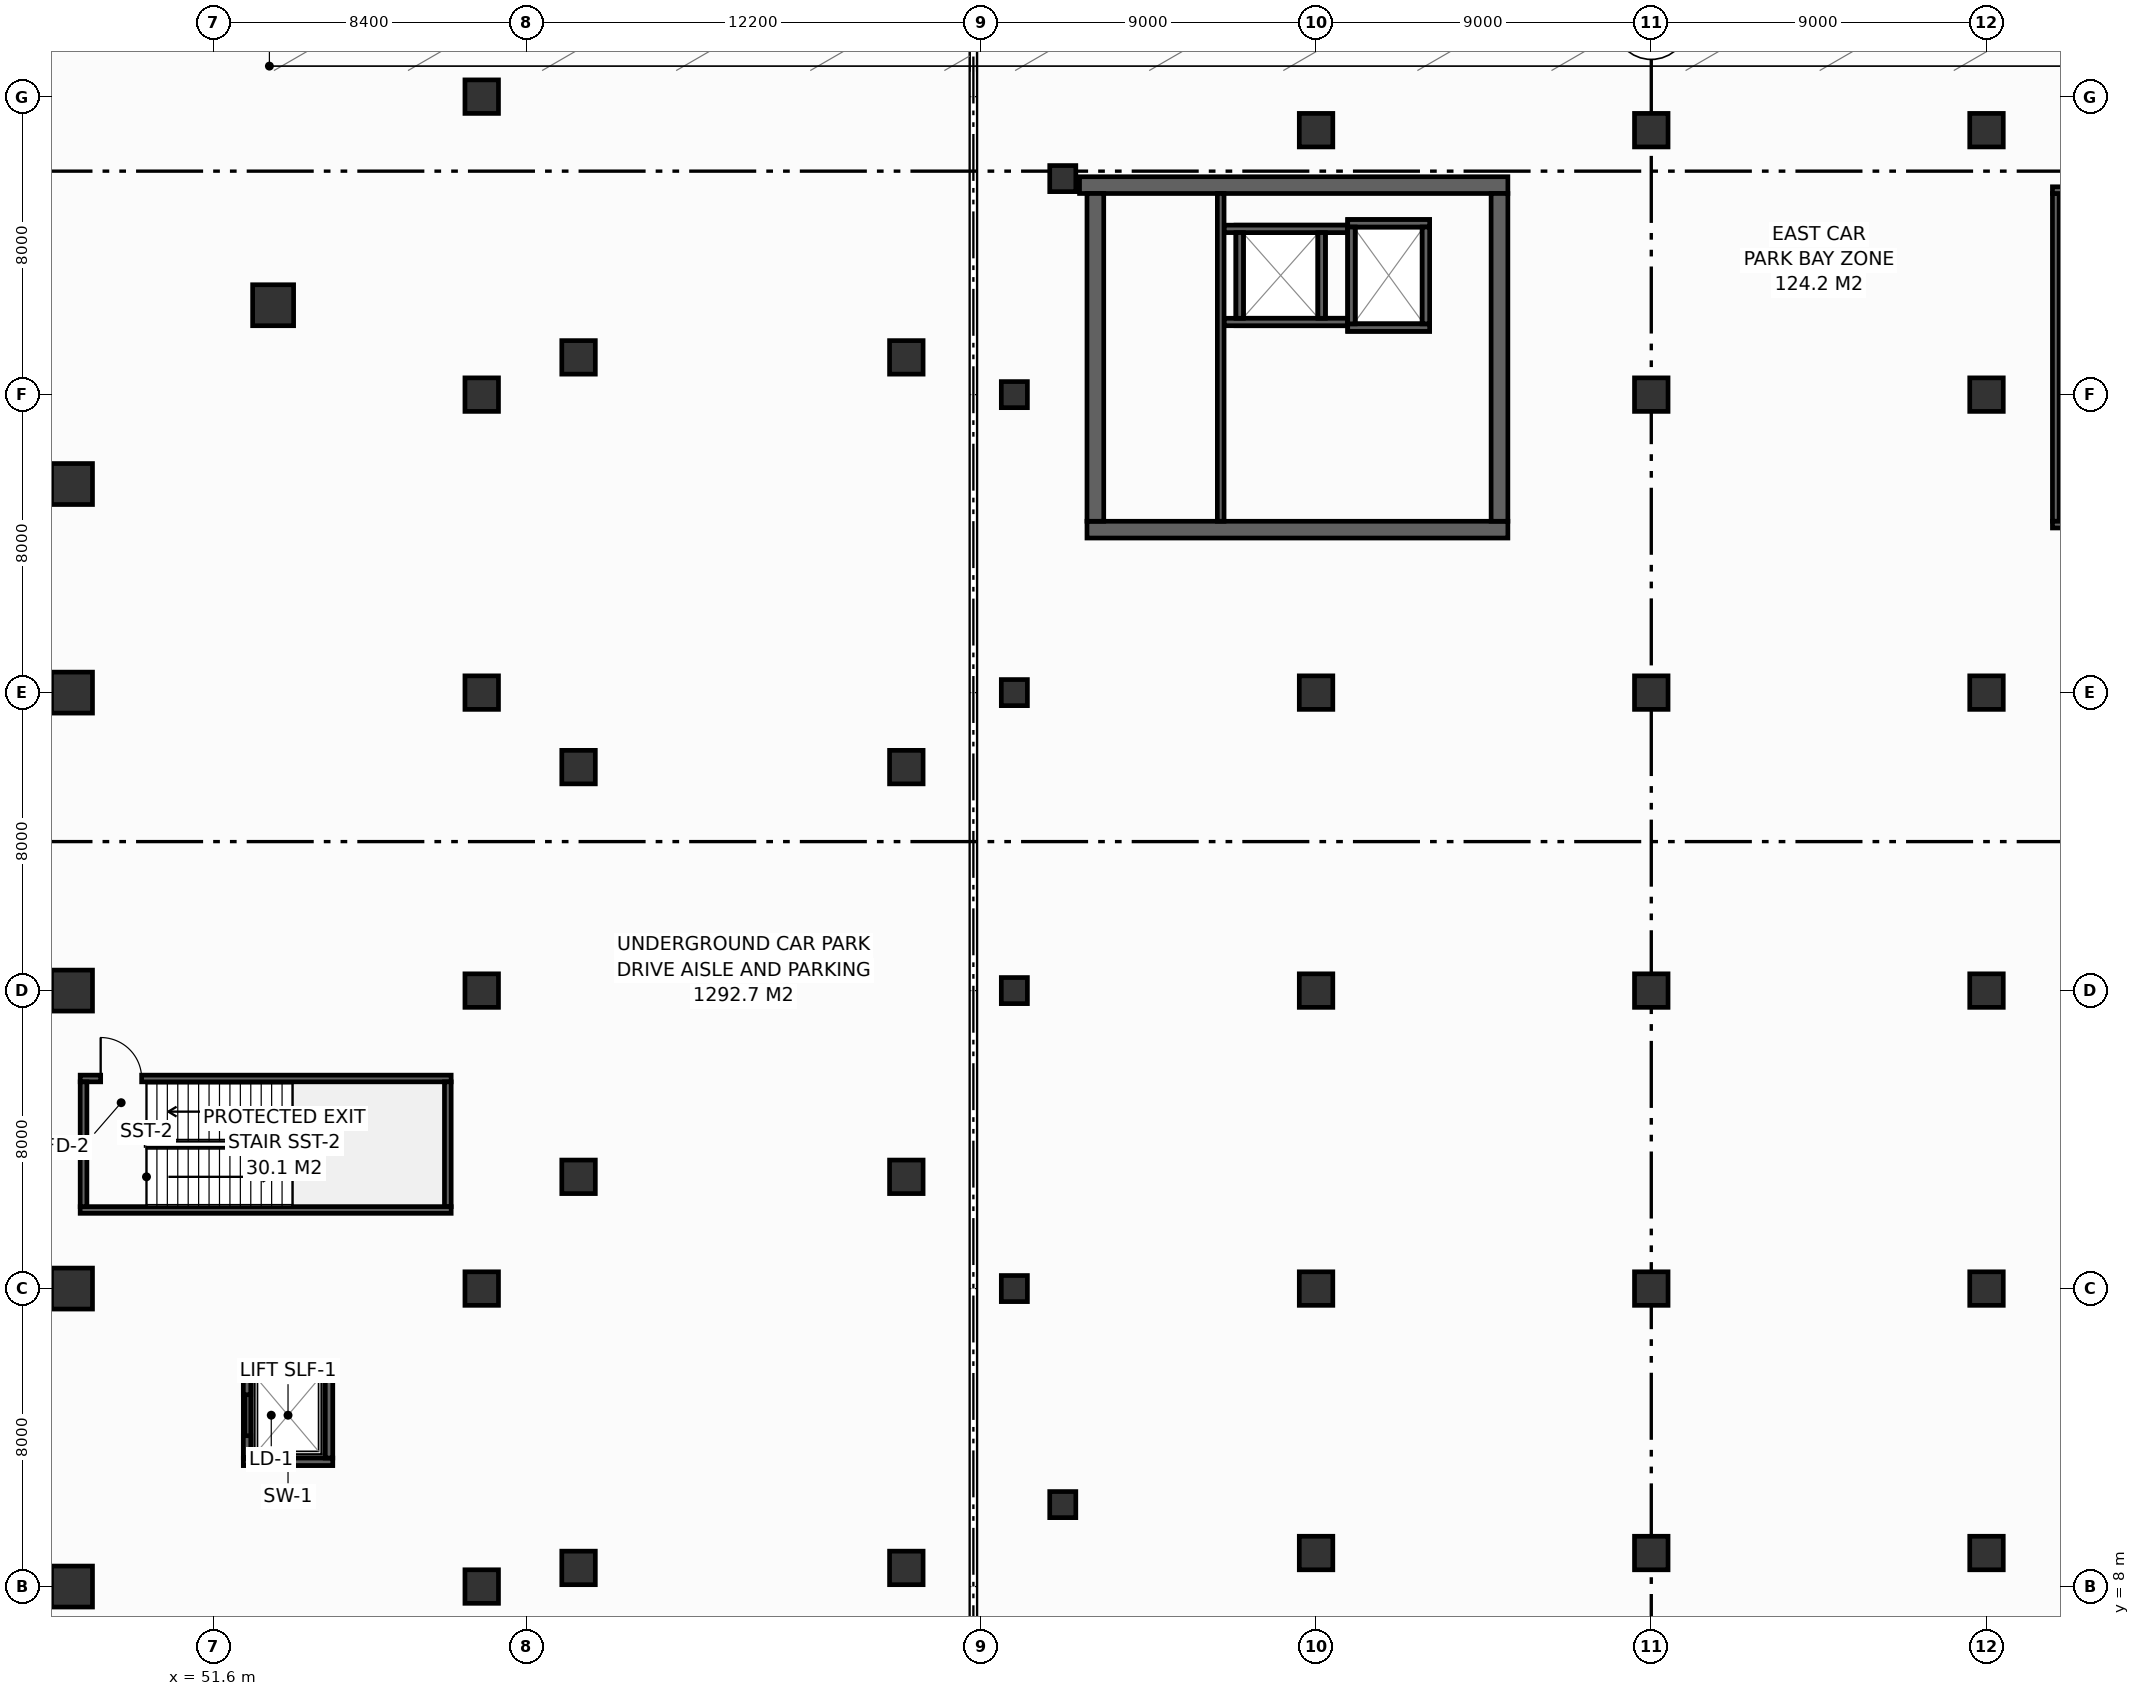
"""IFC4 building model, lengths in metres.
Left out: names, types, materials, properties, quantities, classifications, styles, units other than length and angle.
Written with IfcOpenShell. Run it as: python <this file> out.ifc"""

import sys

from ifc_helpers import new_model, si_unit, direction, frame, frame_2d, origin, origin_2d, place, context, subcontext, project, spatial, rectangle, extrude, element, fill, save


model = new_model("IFC4")
c1 = context("Model", 3, precision=1e-05, world=origin(), true_north=direction((0.0, 1.0)))
c2 = subcontext(c1, "Body", "Model", "MODEL_VIEW")
j1 = project(units=[si_unit("LENGTHUNIT", "METRE"), si_unit("PLANEANGLEUNIT", "RADIAN")], contexts=[c1])
p1 = place(None, origin())
s1 = spatial("IfcSite", under=j1, at=p1, CompositionType="ELEMENT")
p2 = place(p1, origin())
s2 = spatial("IfcBuilding", under=s1, at=p2, CompositionType="ELEMENT")
p3 = place(p2, frame((0.0, 0.0, -10.8)))
s3 = spatial("IfcBuildingStorey", under=s2, at=p3, CompositionType="ELEMENT", Elevation=-10.8)
p4 = place(p3, frame((75.05, 36.375, 0.0), z_axis=(0.0, 0.0, 1.0), x_axis=(1.0, 0.0, 0.0)))
e1 = element("IfcWall", 1, at=p4, inside=s3, PredefinedType="SHEAR", context=c2, shape_type="SweptSolid", body=[
    extrude(rectangle(XDim=11.3, YDim=0.45, at=frame_2d((5.65, 0.0))), origin(), (0.0, 0.0, 1.0), 5.05),
])
p5 = place(p3, frame((74.85, 45.625, 0.0), z_axis=(0.0, 0.0, 1.0), x_axis=(1.0, 0.0, 0.0)))
e2 = element("IfcWall", 2, at=p5, inside=s3, PredefinedType="SHEAR", context=c2, shape_type="SweptSolid", body=[
    extrude(rectangle(XDim=11.5, YDim=0.45, at=frame_2d((5.75, 0.0))), origin(), (0.0, 0.0, 1.0), 5.05),
])
for number, where, z_axis, x_axis in (
    (3, (75.275, 36.6, 0.0), (0.0, 0.0, 1.0), (0.0, 1.0, 0.0)),
    (4, (86.125, 36.6, 0.0), (0.0, 0.0, 1.0), (0.0, 1.0, 0.0)),
):
    element("IfcWall", number, at=place(p3, frame(where, z_axis=z_axis, x_axis=x_axis)), inside=s3, PredefinedType="SHEAR", context=c2, shape_type="SweptSolid", body=[
        extrude(rectangle(XDim=8.8, YDim=0.45, at=frame_2d((4.4, 0.0))), origin(), (0.0, 0.0, 1.0), 5.05),
    ])
for number, where, z_axis, x_axis in (
    (5, (53.2, 42.4, 0.0), (0.0, 0.0, 1.0), (1.0, 0.0, 0.0)),
    (6, (47.8, 8.0, 0.0), (0.0, 0.0, 1.0), (1.0, 0.0, 0.0)),
    (7, (47.8, 16.0, 0.0), (0.0, 0.0, 1.0), (1.0, 0.0, 0.0)),
    (8, (47.8, 24.0, 0.0), (0.0, 0.0, 1.0), (1.0, 0.0, 0.0)),
    (9, (47.8, 32.0, 0.0), (0.0, 0.0, 1.0), (1.0, 0.0, 0.0)),
    (10, (47.8, 37.6, 0.0), (0.0, 0.0, 1.0), (1.0, 0.0, 0.0)),
):
    element("IfcColumn", number, at=place(p3, frame(where, z_axis=z_axis, x_axis=x_axis)), inside=s3, PredefinedType="COLUMN", context=c2, shape_type="SweptSolid", body=[
        extrude(rectangle(XDim=1.1, YDim=1.1, at=origin_2d()), origin(), (0.0, 0.0, 1.0), 5.4),
    ])
for number, where, z_axis, x_axis in (
    (11, (58.8, 8.0, 0.0), (0.0, 0.0, 1.0), (1.0, 0.0, 0.0)),
    (12, (58.8, 16.0, 0.0), (0.0, 0.0, 1.0), (1.0, 0.0, 0.0)),
    (13, (58.8, 24.0, 0.0), (0.0, 0.0, 1.0), (1.0, 0.0, 0.0)),
    (14, (58.8, 32.0, 0.0), (0.0, 0.0, 1.0), (1.0, 0.0, 0.0)),
    (15, (58.8, 40.0, 0.0), (0.0, 0.0, 1.0), (1.0, 0.0, 0.0)),
    (16, (58.8, 48.0, 0.0), (0.0, 0.0, 1.0), (1.0, 0.0, 0.0)),
    (17, (61.4, 8.5, 0.0), (0.0, 0.0, 1.0), (1.0, 0.0, 0.0)),
    (18, (70.2, 8.5, 0.0), (0.0, 0.0, 1.0), (1.0, 0.0, 0.0)),
    (19, (61.4, 19.0, 0.0), (0.0, 0.0, 1.0), (1.0, 0.0, 0.0)),
    (20, (70.2, 19.0, 0.0), (0.0, 0.0, 1.0), (1.0, 0.0, 0.0)),
    (21, (61.4, 30.0, 0.0), (0.0, 0.0, 1.0), (1.0, 0.0, 0.0)),
    (22, (70.2, 30.0, 0.0), (0.0, 0.0, 1.0), (1.0, 0.0, 0.0)),
    (23, (61.4, 41.0, 0.0), (0.0, 0.0, 1.0), (1.0, 0.0, 0.0)),
    (24, (70.2, 41.0, 0.0), (0.0, 0.0, 1.0), (1.0, 0.0, 0.0)),
):
    element("IfcColumn", number, at=place(p3, frame(where, z_axis=z_axis, x_axis=x_axis)), inside=s3, PredefinedType="COLUMN", context=c2, shape_type="SweptSolid", body=[
        extrude(rectangle(XDim=0.9, YDim=0.9, at=origin_2d()), origin(), (0.0, 0.0, 1.0), 5.4),
    ])
for number, where, z_axis, x_axis in (
    (25, (74.4, 10.2, 0.0), (0.0, 0.0, 1.0), (1.0, 0.0, 0.0)),
    (26, (73.1, 16.0, 0.0), (0.0, 0.0, 1.0), (1.0, 0.0, 0.0)),
    (27, (73.1, 24.0, 0.0), (0.0, 0.0, 1.0), (1.0, 0.0, 0.0)),
    (28, (73.1, 32.0, 0.0), (0.0, 0.0, 1.0), (1.0, 0.0, 0.0)),
    (29, (73.1, 40.0, 0.0), (0.0, 0.0, 1.0), (1.0, 0.0, 0.0)),
    (30, (74.4, 45.8, 0.0), (0.0, 0.0, 1.0), (1.0, 0.0, 0.0)),
):
    element("IfcColumn", number, at=place(p3, frame(where, z_axis=z_axis, x_axis=x_axis)), inside=s3, PredefinedType="COLUMN", context=c2, shape_type="SweptSolid", body=[
        extrude(rectangle(XDim=0.7, YDim=0.7, at=origin_2d()), origin(), (0.0, 0.0, 1.0), 5.4),
    ])
for number, where, z_axis, x_axis in (
    (31, (81.2, 8.9, 0.0), (0.0, 0.0, 1.0), (1.0, 0.0, 0.0)),
    (32, (81.2, 16.0, 0.0), (0.0, 0.0, 1.0), (1.0, 0.0, 0.0)),
    (33, (81.2, 24.0, 0.0), (0.0, 0.0, 1.0), (1.0, 0.0, 0.0)),
    (34, (81.2, 32.0, 0.0), (0.0, 0.0, 1.0), (1.0, 0.0, 0.0)),
    (35, (81.2, 47.1, 0.0), (0.0, 0.0, 1.0), (1.0, 0.0, 0.0)),
    (36, (90.2, 8.9, 0.0), (0.0, 0.0, 1.0), (1.0, 0.0, 0.0)),
    (37, (90.2, 16.0, 0.0), (0.0, 0.0, 1.0), (1.0, 0.0, 0.0)),
    (38, (90.2, 24.0, 0.0), (0.0, 0.0, 1.0), (1.0, 0.0, 0.0)),
    (39, (90.2, 32.0, 0.0), (0.0, 0.0, 1.0), (1.0, 0.0, 0.0)),
    (40, (90.2, 40.0, 0.0), (0.0, 0.0, 1.0), (1.0, 0.0, 0.0)),
    (41, (90.2, 47.1, 0.0), (0.0, 0.0, 1.0), (1.0, 0.0, 0.0)),
    (42, (99.2, 8.9, 0.0), (0.0, 0.0, 1.0), (1.0, 0.0, 0.0)),
    (43, (99.2, 16.0, 0.0), (0.0, 0.0, 1.0), (1.0, 0.0, 0.0)),
    (44, (99.2, 24.0, 0.0), (0.0, 0.0, 1.0), (1.0, 0.0, 0.0)),
    (45, (99.2, 32.0, 0.0), (0.0, 0.0, 1.0), (1.0, 0.0, 0.0)),
    (46, (99.2, 40.0, 0.0), (0.0, 0.0, 1.0), (1.0, 0.0, 0.0)),
    (47, (99.2, 47.1, 0.0), (0.0, 0.0, 1.0), (1.0, 0.0, 0.0)),
):
    element("IfcColumn", number, at=place(p3, frame(where, z_axis=z_axis, x_axis=x_axis)), inside=s3, PredefinedType="COLUMN", context=c2, shape_type="SweptSolid", body=[
        extrude(rectangle(XDim=0.9, YDim=0.9, at=origin_2d()), origin(), (0.0, 0.0, 1.0), 5.4),
    ])
for number, where, z_axis, x_axis in (
    (48, (79.05, 41.95, -1.48), (0.0, 0.0, 1.0), (1.0, 0.0, 0.0)),
    (49, (79.05, 44.45, -1.48), (0.0, 0.0, 1.0), (1.0, 0.0, 0.0)),
):
    element("IfcWall", number, at=place(p3, frame(where, z_axis=z_axis, x_axis=x_axis)), inside=s3, PredefinedType="SHEAR", context=c2, shape_type="SweptSolid", body=[
        extrude(rectangle(XDim=3.0, YDim=0.2, at=frame_2d((1.5, 0.0))), origin(), (0.0, 0.0, 1.0), 1.48),
    ])
for number, where, z_axis, x_axis in (
    (50, (79.15, 42.05, -1.48), (0.0, 0.0, 1.0), (0.0, 1.0, 0.0)),
    (51, (81.35, 42.05, -1.48), (0.0, 0.0, 1.0), (0.0, 1.0, 0.0)),
):
    element("IfcWall", number, at=place(p3, frame(where, z_axis=z_axis, x_axis=x_axis)), inside=s3, PredefinedType="SHEAR", context=c2, shape_type="SweptSolid", body=[
        extrude(rectangle(XDim=2.3, YDim=0.2, at=frame_2d((1.15, 0.0))), origin(), (0.0, 0.0, 1.0), 1.48),
    ])
for number, where, z_axis, x_axis in (
    (52, (78.73, 41.95, 0.0), (0.0, 0.0, 1.0), (1.0, 0.0, 0.0)),
    (53, (78.73, 44.45, 0.0), (0.0, 0.0, 1.0), (1.0, 0.0, 0.0)),
):
    element("IfcWall", number, at=place(p3, frame(where, z_axis=z_axis, x_axis=x_axis)), inside=s3, PredefinedType="SHEAR", context=c2, shape_type="SweptSolid", body=[
        extrude(rectangle(XDim=3.32, YDim=0.2, at=frame_2d((1.66, 0.0))), origin(), (0.0, 0.0, 1.0), 5.05),
    ])
for number, where, z_axis, x_axis in (
    (54, (79.15, 42.05, 0.0), (0.0, 0.0, 1.0), (0.0, 1.0, 0.0)),
    (55, (81.35, 42.05, 0.0), (0.0, 0.0, 1.0), (0.0, 1.0, 0.0)),
):
    element("IfcWall", number, at=place(p3, frame(where, z_axis=z_axis, x_axis=x_axis)), inside=s3, PredefinedType="SHEAR", context=c2, shape_type="SweptSolid", body=[
        extrude(rectangle(XDim=2.3, YDim=0.2, at=frame_2d((1.15, 0.0))), origin(), (0.0, 0.0, 1.0), 5.05),
    ])
for number, where, z_axis, x_axis in (
    (56, (82.05, 41.8, -1.48), (0.0, 0.0, 1.0), (1.0, 0.0, 0.0)),
    (57, (82.05, 44.6, -1.48), (0.0, 0.0, 1.0), (1.0, 0.0, 0.0)),
):
    element("IfcWall", number, at=place(p3, frame(where, z_axis=z_axis, x_axis=x_axis)), inside=s3, PredefinedType="SHEAR", context=c2, shape_type="SweptSolid", body=[
        extrude(rectangle(XDim=2.2, YDim=0.2, at=frame_2d((1.1, 0.0))), origin(), (0.0, 0.0, 1.0), 1.48),
    ])
for number, where, z_axis, x_axis in (
    (58, (82.15, 41.9, -1.48), (0.0, 0.0, 1.0), (0.0, 1.0, 0.0)),
    (59, (84.15, 41.9, -1.48), (0.0, 0.0, 1.0), (0.0, 1.0, 0.0)),
):
    element("IfcWall", number, at=place(p3, frame(where, z_axis=z_axis, x_axis=x_axis)), inside=s3, PredefinedType="SHEAR", context=c2, shape_type="SweptSolid", body=[
        extrude(rectangle(XDim=2.6, YDim=0.2, at=frame_2d((1.3, 0.0))), origin(), (0.0, 0.0, 1.0), 1.48),
    ])
for number, where, z_axis, x_axis in (
    (60, (82.05, 41.8, 0.0), (0.0, 0.0, 1.0), (1.0, 0.0, 0.0)),
    (61, (82.05, 44.6, 0.0), (0.0, 0.0, 1.0), (1.0, 0.0, 0.0)),
):
    element("IfcWall", number, at=place(p3, frame(where, z_axis=z_axis, x_axis=x_axis)), inside=s3, PredefinedType="SHEAR", context=c2, shape_type="SweptSolid", body=[
        extrude(rectangle(XDim=2.2, YDim=0.2, at=frame_2d((1.1, 0.0))), origin(), (0.0, 0.0, 1.0), 5.05),
    ])
for number, where, z_axis, x_axis in (
    (62, (82.15, 41.9, 0.0), (0.0, 0.0, 1.0), (0.0, 1.0, 0.0)),
    (63, (84.15, 41.9, 0.0), (0.0, 0.0, 1.0), (0.0, 1.0, 0.0)),
):
    element("IfcWall", number, at=place(p3, frame(where, z_axis=z_axis, x_axis=x_axis)), inside=s3, PredefinedType="SHEAR", context=c2, shape_type="SweptSolid", body=[
        extrude(rectangle(XDim=2.6, YDim=0.2, at=frame_2d((1.3, 0.0))), origin(), (0.0, 0.0, 1.0), 5.05),
    ])
for number, where, z_axis, x_axis in (
    (64, (52.4, 11.35, -1.48), (0.0, 0.0, 1.0), (1.0, 0.0, 0.0)),
    (65, (52.4, 13.85, -1.48), (0.0, 0.0, 1.0), (1.0, 0.0, 0.0)),
):
    element("IfcWall", number, at=place(p3, frame(where, z_axis=z_axis, x_axis=x_axis)), inside=s3, PredefinedType="SHEAR", context=c2, shape_type="SweptSolid", body=[
        extrude(rectangle(XDim=2.4, YDim=0.2, at=frame_2d((1.2, 0.0))), origin(), (0.0, 0.0, 1.0), 1.48),
    ])
for number, where, z_axis, x_axis in (
    (66, (52.5, 11.45, -1.48), (0.0, 0.0, 1.0), (0.0, 1.0, 0.0)),
    (67, (54.7, 11.45, -1.48), (0.0, 0.0, 1.0), (0.0, 1.0, 0.0)),
):
    element("IfcWall", number, at=place(p3, frame(where, z_axis=z_axis, x_axis=x_axis)), inside=s3, PredefinedType="SHEAR", context=c2, shape_type="SweptSolid", body=[
        extrude(rectangle(XDim=2.3, YDim=0.2, at=frame_2d((1.15, 0.0))), origin(), (0.0, 0.0, 1.0), 1.48),
    ])
for number, where, z_axis, x_axis in (
    (68, (52.4, 11.35, 0.0), (0.0, 0.0, 1.0), (1.0, 0.0, 0.0)),
    (69, (52.4, 13.85, 0.0), (0.0, 0.0, 1.0), (1.0, 0.0, 0.0)),
):
    element("IfcWall", number, at=place(p3, frame(where, z_axis=z_axis, x_axis=x_axis)), inside=s3, PredefinedType="SHEAR", context=c2, shape_type="SweptSolid", body=[
        extrude(rectangle(XDim=2.4, YDim=0.2, at=frame_2d((1.2, 0.0))), origin(), (0.0, 0.0, 1.0), 5.05),
    ])
p6 = place(p3, frame((52.5, 11.45, 0.0), z_axis=(0.0, 0.0, 1.0), x_axis=(0.0, 1.0, 0.0)))
e70 = element("IfcWall", 70, at=p6, inside=s3, PredefinedType="SHEAR", context=c2, shape_type="SweptSolid", body=[
    extrude(rectangle(XDim=2.3, YDim=0.2, at=frame_2d((1.15, 0.0))), origin(), (0.0, 0.0, 1.0), 5.05),
])
p7 = place(p6, frame((0.6, 0.0, 0.0)))
e71 = element("IfcOpeningElement", 71, at=p7, cuts=e70, PredefinedType="OPENING", context=c2, shape_type="SweptSolid", body=[
    extrude(rectangle(XDim=1.1, YDim=2.2, at=frame_2d((0.55, 1.1))), frame((0.0, 0.11, 0.0), z_axis=(0.0, -1.0, 0.0), x_axis=(1.0, 0.0, 0.0)), (0.0, 0.0, 1.0), 0.22),
])
p8 = place(p3, frame((54.7, 11.45, 0.0), z_axis=(0.0, 0.0, 1.0), x_axis=(0.0, 1.0, 0.0)))
e72 = element("IfcWall", 72, at=p8, inside=s3, PredefinedType="SHEAR", context=c2, shape_type="SweptSolid", body=[
    extrude(rectangle(XDim=2.3, YDim=0.2, at=frame_2d((1.15, 0.0))), origin(), (0.0, 0.0, 1.0), 5.05),
])
for number, where, z_axis, x_axis in (
    (73, (78.64, 36.6, 0.0), (0.0, 0.0, 1.0), (0.0, 1.0, 0.0)),
    (74, (101.06, 45.4, 0.0), (0.0, 0.0, 1.0), (0.0, -1.0, 0.0)),
):
    element("IfcWall", number, at=place(p3, frame(where, z_axis=z_axis, x_axis=x_axis)), inside=s3, PredefinedType="SHEAR", context=c2, shape_type="SweptSolid", body=[
        extrude(rectangle(XDim=8.8, YDim=0.18, at=frame_2d((4.4, 0.0))), origin(), (0.0, 0.0, 1.0), 5.05),
    ])
for number, where, z_axis, x_axis in (
    (75, (100.97, 36.51, 0.0), (0.0, 0.0, 1.0), (1.0, 0.0, 0.0)),
    (76, (104.38, 45.49, 0.0), (0.0, 0.0, 1.0), (-1.0, 0.0, 0.0)),
):
    element("IfcWall", number, at=place(p3, frame(where, z_axis=z_axis, x_axis=x_axis)), inside=s3, PredefinedType="SHEAR", context=c2, shape_type="SweptSolid", body=[
        extrude(rectangle(XDim=3.41, YDim=0.18, at=frame_2d((1.705, 0.0))), origin(), (0.0, 0.0, 1.0), 5.05),
    ])
p9 = place(p3, frame((48.02, 21.64, 0.0), z_axis=(0.0, 0.0, 1.0), x_axis=(1.0, 0.0, 0.0)))
e77 = element("IfcWall", 77, at=p9, inside=s3, PredefinedType="SHEAR", context=c2, shape_type="SweptSolid", body=[
    extrude(rectangle(XDim=9.96, YDim=0.18, at=frame_2d((4.98, 0.0))), origin(), (0.0, 0.0, 1.0), 5.05),
])
p10 = place(p9, frame((0.55, 0.0, 0.0)))
e78 = element("IfcOpeningElement", 78, at=p10, cuts=e77, PredefinedType="OPENING", context=c2, shape_type="SweptSolid", body=[
    extrude(rectangle(XDim=1.1, YDim=2.15, at=frame_2d((0.55, 1.075))), frame((0.0, 0.1, 0.0), z_axis=(0.0, -1.0, 0.0), x_axis=(1.0, 0.0, 0.0)), (0.0, 0.0, 1.0), 0.2),
])
p11 = place(p3, frame((57.89, 21.55, 0.0), z_axis=(0.0, 0.0, 1.0), x_axis=(0.0, -1.0, 0.0)))
e79 = element("IfcWall", 79, at=p11, inside=s3, PredefinedType="SHEAR", context=c2, shape_type="SweptSolid", body=[
    extrude(rectangle(XDim=3.35, YDim=0.18, at=frame_2d((1.675, 0.0))), origin(), (0.0, 0.0, 1.0), 5.05),
])
p12 = place(p3, frame((57.98, 18.11, 0.0), z_axis=(0.0, 0.0, 1.0), x_axis=(-1.0, 0.0, 0.0)))
e80 = element("IfcWall", 80, at=p12, inside=s3, PredefinedType="SHEAR", context=c2, shape_type="SweptSolid", body=[
    extrude(rectangle(XDim=9.96, YDim=0.18, at=frame_2d((4.98, 0.0))), origin(), (0.0, 0.0, 1.0), 5.05),
])
p13 = place(p3, frame((48.11, 18.2, 0.0), z_axis=(0.0, 0.0, 1.0), x_axis=(0.0, 1.0, 0.0)))
e81 = element("IfcWall", 81, at=p13, inside=s3, PredefinedType="SHEAR", context=c2, shape_type="SweptSolid", body=[
    extrude(rectangle(XDim=3.35, YDim=0.18, at=frame_2d((1.675, 0.0))), origin(), (0.0, 0.0, 1.0), 5.05),
])
p14 = place(p7, origin())
e82 = element("IfcDoor", 82, at=p14, inside=s3, OperationType="SLIDING_TO_LEFT", PredefinedType="DOOR", context=c2, shape_type="SweptSolid", body=[
    extrude(rectangle(XDim=1.1, YDim=2.2, at=frame_2d((0.55, 1.1))), frame((0.0, 0.025, 0.0), z_axis=(0.0, -1.0, 0.0), x_axis=(1.0, 0.0, 0.0)), (0.0, 0.0, 1.0), 0.05),
])
fill(e71, e82)
p15 = place(p10, origin())
e83 = element("IfcDoor", 83, at=p15, inside=s3, OperationType="SINGLE_SWING_LEFT", PredefinedType="DOOR", context=c2, shape_type="SweptSolid", body=[
    extrude(rectangle(XDim=1.1, YDim=2.15, at=frame_2d((0.55, 1.075))), frame((0.0, 0.025, 0.0), z_axis=(0.0, -1.0, 0.0), x_axis=(1.0, 0.0, 0.0)), (0.0, 0.0, 1.0), 0.05),
])
fill(e78, e83)
save(model, sys.argv[1])
